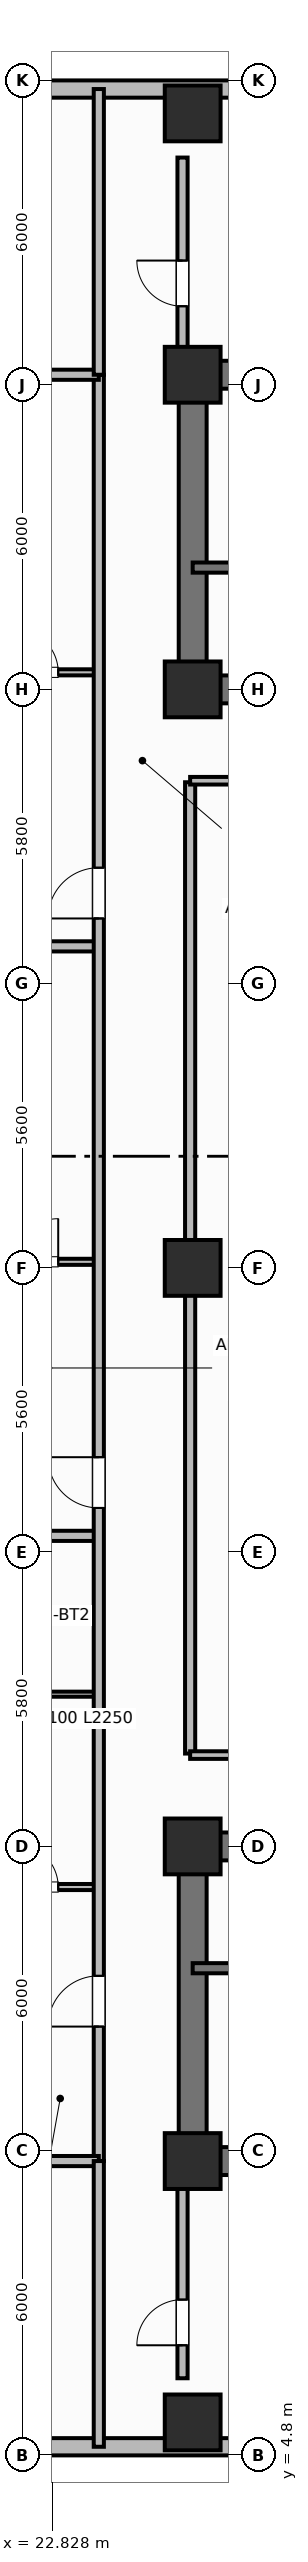
"""IFC4 building model, lengths in metres.
Left out: names, types, materials, properties, quantities, classifications, styles, units other than length and angle.
Written with IfcOpenShell. Run it as: python <this file> out.ifc"""

import sys

from ifc_helpers import new_model, si_unit, direction, frame, frame_2d, origin, origin_2d, place, context, subcontext, project, spatial, rectangle, extrude, element, fill, save


model = new_model("IFC4")
c1 = context("Model", 3, precision=1e-05, world=origin(), true_north=direction((0.0, 1.0)))
c2 = subcontext(c1, "Body", "Model", "MODEL_VIEW")
j1 = project(units=[si_unit("LENGTHUNIT", "METRE"), si_unit("PLANEANGLEUNIT", "RADIAN")], contexts=[c1])
p1 = place(None, origin())
s1 = spatial("IfcSite", under=j1, at=p1, CompositionType="ELEMENT")
p2 = place(p1, origin())
s2 = spatial("IfcBuilding", under=s1, at=p2, CompositionType="ELEMENT")
p3 = place(p2, frame((0.0, 0.0, 110.5)))
s3 = spatial("IfcBuildingStorey", under=s2, at=p3, CompositionType="ELEMENT", Elevation=110.5)
p4 = place(p3, frame((52.8, 10.6, 0.0), z_axis=(0.0, 0.0, 1.0), x_axis=(-1.0, 0.0, 0.0)))
e1 = element("IfcWall", 1, at=p4, inside=s3, PredefinedType="SHEAR", context=c2, shape_type="SweptSolid", body=[
    extrude(rectangle(XDim=27.2, YDim=0.55, at=frame_2d((13.6, 0.0))), origin(), (0.0, 0.0, 1.0), 3.7),
])
p5 = place(p3, frame((25.6, 10.875, 0.0), z_axis=(0.0, 0.0, 1.0), x_axis=(0.0, 1.0, 0.0)))
e2 = element("IfcWall", 2, at=p5, inside=s3, PredefinedType="SHEAR", context=c2, shape_type="SweptSolid", body=[
    extrude(rectangle(XDim=5.65, YDim=0.55, at=frame_2d((2.825, 0.0))), origin(), (0.0, 0.0, 1.0), 3.7),
])
p6 = place(p3, frame((25.6, 16.8, 0.0), z_axis=(0.0, 0.0, 1.0), x_axis=(1.0, 0.0, 0.0)))
e3 = element("IfcWall", 3, at=p6, inside=s3, PredefinedType="SHEAR", context=c2, shape_type="SweptSolid", body=[
    extrude(rectangle(XDim=27.2, YDim=0.55, at=frame_2d((13.6, 0.0))), origin(), (0.0, 0.0, 1.0), 3.7),
])
p7 = place(p6, frame((1.8, 0.0, 0.0)))
e4 = element("IfcOpeningElement", 4, at=p7, cuts=e3, PredefinedType="OPENING", context=c2, shape_type="SweptSolid", body=[
    extrude(rectangle(XDim=1.1, YDim=2.15, at=frame_2d((0.55, 1.075))), frame((0.0, 0.285, 0.0), z_axis=(0.0, -1.0, 0.0), x_axis=(1.0, 0.0, 0.0)), (0.0, 0.0, 1.0), 0.57),
])
p8 = place(p6, frame((5.6, 0.0, 0.0)))
e5 = element("IfcOpeningElement", 5, at=p8, cuts=e3, PredefinedType="OPENING", context=c2, shape_type="SweptSolid", body=[
    extrude(rectangle(XDim=0.85, YDim=2.1, at=frame_2d((0.425, 1.05))), frame((0.0, 0.285, 0.0), z_axis=(0.0, -1.0, 0.0), x_axis=(1.0, 0.0, 0.0)), (0.0, 0.0, 1.0), 0.57),
])
p9 = place(p6, frame((13.0, 0.0, 0.0)))
e6 = element("IfcOpeningElement", 6, at=p9, cuts=e3, PredefinedType="OPENING", context=c2, shape_type="SweptSolid", body=[
    extrude(rectangle(XDim=1.2, YDim=2.15, at=frame_2d((0.6, 1.075))), frame((0.0, 0.285, 0.0), z_axis=(0.0, -1.0, 0.0), x_axis=(1.0, 0.0, 0.0)), (0.0, 0.0, 1.0), 0.57),
])
p10 = place(p6, frame((19.2, 0.0, 0.0)))
e7 = element("IfcOpeningElement", 7, at=p10, cuts=e3, PredefinedType="OPENING", context=c2, shape_type="SweptSolid", body=[
    extrude(rectangle(XDim=0.85, YDim=2.1, at=frame_2d((0.425, 1.05))), frame((0.0, 0.285, 0.0), z_axis=(0.0, -1.0, 0.0), x_axis=(1.0, 0.0, 0.0)), (0.0, 0.0, 1.0), 0.57),
])
p11 = place(p6, frame((23.8, 0.0, 0.0)))
e8 = element("IfcOpeningElement", 8, at=p11, cuts=e3, PredefinedType="OPENING", context=c2, shape_type="SweptSolid", body=[
    extrude(rectangle(XDim=0.9, YDim=2.1, at=frame_2d((0.45, 1.05))), frame((0.0, 0.285, 0.0), z_axis=(0.0, -1.0, 0.0), x_axis=(1.0, 0.0, 0.0)), (0.0, 0.0, 1.0), 0.57),
])
p12 = place(p3, frame((25.6, 45.8, 0.0), z_axis=(0.0, 0.0, 1.0), x_axis=(1.0, 0.0, 0.0)))
e9 = element("IfcWall", 9, at=p12, inside=s3, PredefinedType="SHEAR", context=c2, shape_type="SweptSolid", body=[
    extrude(rectangle(XDim=27.2, YDim=0.55, at=frame_2d((13.6, 0.0))), origin(), (0.0, 0.0, 1.0), 3.7),
])
p13 = place(p3, frame((25.6, 39.875, 0.0), z_axis=(0.0, 0.0, 1.0), x_axis=(0.0, 1.0, 0.0)))
e10 = element("IfcWall", 10, at=p13, inside=s3, PredefinedType="SHEAR", context=c2, shape_type="SweptSolid", body=[
    extrude(rectangle(XDim=5.65, YDim=0.55, at=frame_2d((2.825, 0.0))), origin(), (0.0, 0.0, 1.0), 3.7),
])
p14 = place(p3, frame((52.8, 39.6, 0.0), z_axis=(0.0, 0.0, 1.0), x_axis=(-1.0, 0.0, 0.0)))
e11 = element("IfcWall", 11, at=p14, inside=s3, PredefinedType="SHEAR", context=c2, shape_type="SweptSolid", body=[
    extrude(rectangle(XDim=27.2, YDim=0.55, at=frame_2d((13.6, 0.0))), origin(), (0.0, 0.0, 1.0), 3.7),
])
p15 = place(p14, frame((24.2, 0.0, 0.0)))
e12 = element("IfcOpeningElement", 12, at=p15, cuts=e11, PredefinedType="OPENING", context=c2, shape_type="SweptSolid", body=[
    extrude(rectangle(XDim=1.1, YDim=2.15, at=frame_2d((0.55, 1.075))), frame((0.0, 0.285, 0.0), z_axis=(0.0, -1.0, 0.0), x_axis=(1.0, 0.0, 0.0)), (0.0, 0.0, 1.0), 0.57),
])
p16 = place(p14, frame((20.55, 0.0, 0.0)))
e13 = element("IfcOpeningElement", 13, at=p16, cuts=e11, PredefinedType="OPENING", context=c2, shape_type="SweptSolid", body=[
    extrude(rectangle(XDim=0.95, YDim=2.1, at=frame_2d((0.475, 1.05))), frame((0.0, 0.285, 0.0), z_axis=(0.0, -1.0, 0.0), x_axis=(1.0, 0.0, 0.0)), (0.0, 0.0, 1.0), 0.57),
])
p17 = place(p14, frame((15.1, 0.0, 0.0)))
e14 = element("IfcOpeningElement", 14, at=p17, cuts=e11, PredefinedType="OPENING", context=c2, shape_type="SweptSolid", body=[
    extrude(rectangle(XDim=1.2, YDim=2.15, at=frame_2d((0.6, 1.075))), frame((0.0, 0.285, 0.0), z_axis=(0.0, -1.0, 0.0), x_axis=(1.0, 0.0, 0.0)), (0.0, 0.0, 1.0), 0.57),
])
p18 = place(p14, frame((11.3, 0.0, 0.0)))
e15 = element("IfcOpeningElement", 15, at=p18, cuts=e11, PredefinedType="OPENING", context=c2, shape_type="SweptSolid", body=[
    extrude(rectangle(XDim=1.3, YDim=2.2, at=frame_2d((0.65, 1.1))), frame((0.0, 0.285, 0.0), z_axis=(0.0, -1.0, 0.0), x_axis=(1.0, 0.0, 0.0)), (0.0, 0.0, 1.0), 0.57),
])
p19 = place(p14, frame((7.25, 0.0, 0.0)))
e16 = element("IfcOpeningElement", 16, at=p19, cuts=e11, PredefinedType="OPENING", context=c2, shape_type="SweptSolid", body=[
    extrude(rectangle(XDim=0.85, YDim=2.1, at=frame_2d((0.425, 1.05))), frame((0.0, 0.285, 0.0), z_axis=(0.0, -1.0, 0.0), x_axis=(1.0, 0.0, 0.0)), (0.0, 0.0, 1.0), 0.57),
])
p20 = place(p14, frame((3.0, 0.0, 0.0)))
e17 = element("IfcOpeningElement", 17, at=p20, cuts=e11, PredefinedType="OPENING", context=c2, shape_type="SweptSolid", body=[
    extrude(rectangle(XDim=0.9, YDim=2.1, at=frame_2d((0.45, 1.05))), frame((0.0, 0.285, 0.0), z_axis=(0.0, -1.0, 0.0), x_axis=(1.0, 0.0, 0.0)), (0.0, 0.0, 1.0), 0.57),
])
for number, where, z_axis, x_axis in (
    (18, (25.6, 10.6, 0.0), (0.0, 0.0, 1.0), (1.0, 0.0, 0.0)),
    (19, (25.6, 16.8, 0.0), (0.0, 0.0, 1.0), (1.0, 0.0, 0.0)),
    (20, (25.6, 39.6, 0.0), (0.0, 0.0, 1.0), (1.0, 0.0, 0.0)),
    (21, (25.6, 45.8, 0.0), (0.0, 0.0, 1.0), (1.0, 0.0, 0.0)),
    (22, (25.6, 28.2, 0.0), (0.0, 0.0, 1.0), (1.0, 0.0, 0.0)),
    (23, (25.6, 5.45, 0.0), (0.0, 0.0, 1.0), (1.0, 0.0, 0.0)),
    (24, (25.6, 50.95, 0.0), (0.0, 0.0, 1.0), (1.0, 0.0, 0.0)),
):
    element("IfcColumn", number, at=place(p3, frame(where, z_axis=z_axis, x_axis=x_axis)), inside=s3, PredefinedType="COLUMN", context=c2, shape_type="SweptSolid", body=[
        extrude(rectangle(XDim=1.1, YDim=1.1, at=origin_2d()), origin(), (0.0, 0.0, 1.0), 3.7),
    ])
p21 = place(p3, frame((18.6, 4.97, 0.0), z_axis=(0.0, 0.0, 1.0), x_axis=(1.0, 0.0, 0.0)))
e25 = element("IfcWall", 25, at=p21, inside=s3, PredefinedType="SOLIDWALL", context=c2, shape_type="SweptSolid", body=[
    extrude(rectangle(XDim=17.4, YDim=0.34, at=frame_2d((8.7, 0.0))), origin(), (0.0, 0.0, 1.0), 2.7),
])
p22 = place(p21, frame((1.56, 0.0, 0.73)))
e26 = element("IfcOpeningElement", 26, at=p22, cuts=e25, PredefinedType="OPENING", context=c2, shape_type="SweptSolid", body=[
    extrude(rectangle(XDim=1.4, YDim=1.85, at=frame_2d((0.7, 0.925))), frame((0.0, 0.18, 0.0), z_axis=(0.0, -1.0, 0.0), x_axis=(1.0, 0.0, 0.0)), (0.0, 0.0, 1.0), 0.36),
])
p23 = place(p21, frame((8.35, 0.0, 0.73)))
e27 = element("IfcOpeningElement", 27, at=p23, cuts=e25, PredefinedType="OPENING", context=c2, shape_type="SweptSolid", body=[
    extrude(rectangle(XDim=1.4, YDim=1.85, at=frame_2d((0.7, 0.925))), frame((0.0, 0.18, 0.0), z_axis=(0.0, -1.0, 0.0), x_axis=(1.0, 0.0, 0.0)), (0.0, 0.0, 1.0), 0.36),
])
p24 = place(p21, frame((13.74, 0.0, 0.73)))
e28 = element("IfcOpeningElement", 28, at=p24, cuts=e25, PredefinedType="OPENING", context=c2, shape_type="SweptSolid", body=[
    extrude(rectangle(XDim=1.4, YDim=1.85, at=frame_2d((0.7, 0.925))), frame((0.0, 0.18, 0.0), z_axis=(0.0, -1.0, 0.0), x_axis=(1.0, 0.0, 0.0)), (0.0, 0.0, 1.0), 0.36),
])
p25 = place(p3, frame((36.0, 51.43, 0.0), z_axis=(0.0, 0.0, 1.0), x_axis=(-1.0, 0.0, 0.0)))
e29 = element("IfcWall", 29, at=p25, inside=s3, PredefinedType="SOLIDWALL", context=c2, shape_type="SweptSolid", body=[
    extrude(rectangle(XDim=17.4, YDim=0.34, at=frame_2d((8.7, 0.0))), origin(), (0.0, 0.0, 1.0), 2.7),
])
p26 = place(p25, frame((2.113, 0.0, 0.73)))
e30 = element("IfcOpeningElement", 30, at=p26, cuts=e29, PredefinedType="OPENING", context=c2, shape_type="SweptSolid", body=[
    extrude(rectangle(XDim=1.8, YDim=1.85, at=frame_2d((0.9, 0.925))), frame((0.0, 0.18, 0.0), z_axis=(0.0, -1.0, 0.0), x_axis=(1.0, 0.0, 0.0)), (0.0, 0.0, 1.0), 0.36),
])
p27 = place(p25, frame((5.788, 0.0, 0.73)))
e31 = element("IfcOpeningElement", 31, at=p27, cuts=e29, PredefinedType="OPENING", context=c2, shape_type="SweptSolid", body=[
    extrude(rectangle(XDim=1.8, YDim=1.85, at=frame_2d((0.9, 0.925))), frame((0.0, 0.18, 0.0), z_axis=(0.0, -1.0, 0.0), x_axis=(1.0, 0.0, 0.0)), (0.0, 0.0, 1.0), 0.36),
])
p28 = place(p25, frame((13.837, 0.0, 0.73)))
e32 = element("IfcOpeningElement", 32, at=p28, cuts=e29, PredefinedType="OPENING", context=c2, shape_type="SweptSolid", body=[
    extrude(rectangle(XDim=1.8, YDim=1.85, at=frame_2d((0.9, 0.925))), frame((0.0, 0.18, 0.0), z_axis=(0.0, -1.0, 0.0), x_axis=(1.0, 0.0, 0.0)), (0.0, 0.0, 1.0), 0.36),
])
p29 = place(p3, frame((25.6, 14.4, 0.0), z_axis=(0.0, 0.0, 1.0), x_axis=(1.0, 0.0, 0.0)))
e33 = element("IfcWall", 33, at=p29, inside=s3, PredefinedType="SHEAR", context=c2, shape_type="SweptSolid", body=[
    extrude(rectangle(XDim=9.55, YDim=0.2, at=frame_2d((4.775, 0.0))), origin(), (0.0, 0.0, 1.0), 3.7),
])
p30 = place(p29, frame((1.05, 0.0, 0.0)))
e34 = element("IfcOpeningElement", 34, at=p30, cuts=e33, PredefinedType="OPENING", context=c2, shape_type="SweptSolid", body=[
    extrude(rectangle(XDim=1.1, YDim=2.15, at=frame_2d((0.55, 1.075))), frame((0.0, 0.11, 0.0), z_axis=(0.0, -1.0, 0.0), x_axis=(1.0, 0.0, 0.0)), (0.0, 0.0, 1.0), 0.22),
])
p31 = place(p3, frame((35.15, 42.0, 0.0), z_axis=(0.0, 0.0, 1.0), x_axis=(-1.0, 0.0, 0.0)))
e35 = element("IfcWall", 35, at=p31, inside=s3, PredefinedType="SHEAR", context=c2, shape_type="SweptSolid", body=[
    extrude(rectangle(XDim=9.55, YDim=0.2, at=frame_2d((4.775, 0.0))), origin(), (0.0, 0.0, 1.0), 3.7),
])
p32 = place(p31, frame((7.25, 0.0, 0.0)))
e36 = element("IfcOpeningElement", 36, at=p32, cuts=e35, PredefinedType="OPENING", context=c2, shape_type="SweptSolid", body=[
    extrude(rectangle(XDim=1.1, YDim=2.15, at=frame_2d((0.55, 1.075))), frame((0.0, 0.11, 0.0), z_axis=(0.0, -1.0, 0.0), x_axis=(1.0, 0.0, 0.0)), (0.0, 0.0, 1.0), 0.22),
])
p33 = place(p3, frame((25.55, 18.63, 0.0), z_axis=(0.0, 0.0, 1.0), x_axis=(0.0, 1.0, 0.0)))
e37 = element("IfcWall", 37, at=p33, inside=s3, PredefinedType="PARTITIONING", context=c2, shape_type="SweptSolid", body=[
    extrude(rectangle(XDim=19.14, YDim=0.2, at=frame_2d((9.57, 0.0))), origin(), (0.0, 0.0, 1.0), 2.53),
])
for number, where, z_axis, x_axis in (
    (38, (25.55, 18.6, 0.0), (0.0, 0.0, 1.0), (1.0, 0.0, 0.0)),
    (39, (25.55, 37.8, 0.0), (0.0, 0.0, 1.0), (1.0, 0.0, 0.0)),
):
    element("IfcWall", number, at=place(p3, frame(where, z_axis=z_axis, x_axis=x_axis)), inside=s3, PredefinedType="PARTITIONING", context=c2, shape_type="SweptSolid", body=[
        extrude(rectangle(XDim=6.5, YDim=0.15, at=frame_2d((3.25, 0.0))), origin(), (0.0, 0.0, 1.0), 2.53),
    ])
p34 = place(p3, frame((21.5, 16.0, 0.0), z_axis=(0.0, 0.0, 1.0), x_axis=(1.0, 0.0, 0.0)))
e40 = element("IfcWall", 40, at=p34, inside=s3, PredefinedType="PARTITIONING", context=c2, shape_type="SweptSolid", body=[
    extrude(rectangle(XDim=2.25, YDim=0.12, at=frame_2d((1.125, 0.0))), origin(), (0.0, 0.0, 1.0), 2.53),
])
p35 = place(p34, frame((0.6, 0.0, 0.0)))
e41 = element("IfcOpeningElement", 41, at=p35, cuts=e40, PredefinedType="OPENING", context=c2, shape_type="SweptSolid", body=[
    extrude(rectangle(XDim=0.85, YDim=2.1, at=frame_2d((0.425, 1.05))), frame((0.0, 0.07, 0.0), z_axis=(0.0, -1.0, 0.0), x_axis=(1.0, 0.0, 0.0)), (0.0, 0.0, 1.0), 0.14),
])
p36 = place(p3, frame((21.5, 19.8, 0.0), z_axis=(0.0, 0.0, 1.0), x_axis=(1.0, 0.0, 0.0)))
e42 = element("IfcWall", 42, at=p36, inside=s3, PredefinedType="PARTITIONING", context=c2, shape_type="SweptSolid", body=[
    extrude(rectangle(XDim=2.25, YDim=0.1, at=frame_2d((1.125, 0.0))), origin(), (0.0, 0.0, 1.0), 2.53),
])
p37 = place(p3, frame((14.57, 22.92, 0.0), z_axis=(0.0, 0.0, 1.0), x_axis=(1.0, 0.0, 0.0)))
e43 = element("IfcWall", 43, at=p37, inside=s3, PredefinedType="PARTITIONING", context=c2, shape_type="SweptSolid", body=[
    extrude(rectangle(XDim=9.18, YDim=0.2, at=frame_2d((4.59, 0.0))), origin(), (0.0, 0.0, 1.0), 2.53),
])
p38 = place(p3, frame((21.5, 28.32, 0.0), z_axis=(0.0, 0.0, 1.0), x_axis=(1.0, 0.0, 0.0)))
e44 = element("IfcWall", 44, at=p38, inside=s3, PredefinedType="PARTITIONING", context=c2, shape_type="SweptSolid", body=[
    extrude(rectangle(XDim=2.25, YDim=0.12, at=frame_2d((1.125, 0.0))), origin(), (0.0, 0.0, 1.0), 2.53),
])
p39 = place(p38, frame((0.6, 0.0, 0.0)))
e45 = element("IfcOpeningElement", 45, at=p39, cuts=e44, PredefinedType="OPENING", context=c2, shape_type="SweptSolid", body=[
    extrude(rectangle(XDim=0.85, YDim=2.1, at=frame_2d((0.425, 1.05))), frame((0.0, 0.07, 0.0), z_axis=(0.0, -1.0, 0.0), x_axis=(1.0, 0.0, 0.0)), (0.0, 0.0, 1.0), 0.14),
])
p40 = place(p3, frame((14.57, 34.536, 0.0), z_axis=(0.0, 0.0, 1.0), x_axis=(1.0, 0.0, 0.0)))
e46 = element("IfcWall", 46, at=p40, inside=s3, PredefinedType="PARTITIONING", context=c2, shape_type="SweptSolid", body=[
    extrude(rectangle(XDim=9.18, YDim=0.2, at=frame_2d((4.59, 0.0))), origin(), (0.0, 0.0, 1.0), 2.53),
])
p41 = place(p3, frame((21.5, 39.936, 0.0), z_axis=(0.0, 0.0, 1.0), x_axis=(1.0, 0.0, 0.0)))
e47 = element("IfcWall", 47, at=p41, inside=s3, PredefinedType="PARTITIONING", context=c2, shape_type="SweptSolid", body=[
    extrude(rectangle(XDim=2.25, YDim=0.12, at=frame_2d((1.125, 0.0))), origin(), (0.0, 0.0, 1.0), 2.53),
])
p42 = place(p41, frame((0.6, 0.0, 0.0)))
e48 = element("IfcOpeningElement", 48, at=p42, cuts=e47, PredefinedType="OPENING", context=c2, shape_type="SweptSolid", body=[
    extrude(rectangle(XDim=0.85, YDim=2.1, at=frame_2d((0.425, 1.05))), frame((0.0, 0.07, 0.0), z_axis=(0.0, -1.0, 0.0), x_axis=(1.0, 0.0, 0.0)), (0.0, 0.0, 1.0), 0.14),
])
p43 = place(p3, frame((23.75, 10.6, 0.0), z_axis=(0.0, 0.0, 1.0), x_axis=(0.0, 1.0, 0.0)))
e49 = element("IfcWall", 49, at=p43, inside=s3, PredefinedType="PARTITIONING", context=c2, shape_type="SweptSolid", body=[
    extrude(rectangle(XDim=35.2, YDim=0.2, at=frame_2d((17.6, 0.0))), origin(), (0.0, 0.0, 1.0), 2.53),
])
p44 = place(p43, frame((2.65, 0.0, 0.0)))
e50 = element("IfcOpeningElement", 50, at=p44, cuts=e49, PredefinedType="OPENING", context=c2, shape_type="SweptSolid", body=[
    extrude(rectangle(XDim=1.0, YDim=2.15, at=frame_2d((0.5, 1.075))), frame((0.0, 0.11, 0.0), z_axis=(0.0, -1.0, 0.0), x_axis=(1.0, 0.0, 0.0)), (0.0, 0.0, 1.0), 0.22),
])
p45 = place(p43, frame((12.87, 0.0, 0.0)))
e51 = element("IfcOpeningElement", 51, at=p45, cuts=e49, PredefinedType="OPENING", context=c2, shape_type="SweptSolid", body=[
    extrude(rectangle(XDim=1.0, YDim=2.15, at=frame_2d((0.5, 1.075))), frame((0.0, 0.11, 0.0), z_axis=(0.0, -1.0, 0.0), x_axis=(1.0, 0.0, 0.0)), (0.0, 0.0, 1.0), 0.22),
])
p46 = place(p43, frame((24.486, 0.0, 0.0)))
e52 = element("IfcOpeningElement", 52, at=p46, cuts=e49, PredefinedType="OPENING", context=c2, shape_type="SweptSolid", body=[
    extrude(rectangle(XDim=1.0, YDim=2.15, at=frame_2d((0.5, 1.075))), frame((0.0, 0.11, 0.0), z_axis=(0.0, -1.0, 0.0), x_axis=(1.0, 0.0, 0.0)), (0.0, 0.0, 1.0), 0.22),
])
for number, where, z_axis, x_axis in (
    (53, (14.99, 10.6, 0.0), (0.0, 0.0, 1.0), (1.0, 0.0, 0.0)),
    (54, (14.99, 45.8, 0.0), (0.0, 0.0, 1.0), (1.0, 0.0, 0.0)),
):
    element("IfcWall", number, at=place(p3, frame(where, z_axis=z_axis, x_axis=x_axis)), inside=s3, PredefinedType="PARTITIONING", context=c2, shape_type="SweptSolid", body=[
        extrude(rectangle(XDim=8.76, YDim=0.2, at=frame_2d((4.38, 0.0))), origin(), (0.0, 0.0, 1.0), 2.53),
    ])
p47 = place(p3, frame((23.75, 4.97, 0.0), z_axis=(0.0, 0.0, 1.0), x_axis=(0.0, 1.0, 0.0)))
e55 = element("IfcWall", 55, at=p47, inside=s3, PredefinedType="PARTITIONING", context=c2, shape_type="SweptSolid", body=[
    extrude(rectangle(XDim=5.63, YDim=0.2, at=frame_2d((2.815, 0.0))), origin(), (0.0, 0.0, 1.0), 2.53),
])
p48 = place(p3, frame((23.75, 45.8, 0.0), z_axis=(0.0, 0.0, 1.0), x_axis=(0.0, 1.0, 0.0)))
e56 = element("IfcWall", 56, at=p48, inside=s3, PredefinedType="PARTITIONING", context=c2, shape_type="SweptSolid", body=[
    extrude(rectangle(XDim=5.63, YDim=0.2, at=frame_2d((2.815, 0.0))), origin(), (0.0, 0.0, 1.0), 2.53),
])
p49 = place(p3, frame((25.4, 6.32, 0.0), z_axis=(0.0, 0.0, 1.0), x_axis=(0.0, 1.0, 0.0)))
e57 = element("IfcWall", 57, at=p49, inside=s3, PredefinedType="PARTITIONING", context=c2, shape_type="SweptSolid", body=[
    extrude(rectangle(XDim=3.98, YDim=0.2, at=frame_2d((1.99, 0.0))), origin(), (0.0, 0.0, 1.0), 2.53),
])
p50 = place(p49, frame((0.65, 0.0, 0.0)))
e58 = element("IfcOpeningElement", 58, at=p50, cuts=e57, PredefinedType="OPENING", context=c2, shape_type="SweptSolid", body=[
    extrude(rectangle(XDim=0.9, YDim=2.1, at=frame_2d((0.45, 1.05))), frame((0.0, 0.11, 0.0), z_axis=(0.0, -1.0, 0.0), x_axis=(1.0, 0.0, 0.0)), (0.0, 0.0, 1.0), 0.22),
])
p51 = place(p3, frame((25.4, 46.1, 0.0), z_axis=(0.0, 0.0, 1.0), x_axis=(0.0, 1.0, 0.0)))
e59 = element("IfcWall", 59, at=p51, inside=s3, PredefinedType="PARTITIONING", context=c2, shape_type="SweptSolid", body=[
    extrude(rectangle(XDim=3.98, YDim=0.2, at=frame_2d((1.99, 0.0))), origin(), (0.0, 0.0, 1.0), 2.53),
])
p52 = place(p51, frame((1.05, 0.0, 0.0)))
e60 = element("IfcOpeningElement", 60, at=p52, cuts=e59, PredefinedType="OPENING", context=c2, shape_type="SweptSolid", body=[
    extrude(rectangle(XDim=0.9, YDim=2.1, at=frame_2d((0.45, 1.05))), frame((0.0, 0.11, 0.0), z_axis=(0.0, -1.0, 0.0), x_axis=(1.0, 0.0, 0.0)), (0.0, 0.0, 1.0), 0.22),
])
p53 = place(p35, origin())
e61 = element("IfcDoor", 61, at=p53, inside=s3, OperationType="SINGLE_SWING_LEFT", PredefinedType="DOOR", context=c2, shape_type="SweptSolid", body=[
    extrude(rectangle(XDim=0.85, YDim=2.1, at=frame_2d((0.425, 1.05))), frame((0.0, 0.025, 0.0), z_axis=(0.0, -1.0, 0.0), x_axis=(1.0, 0.0, 0.0)), (0.0, 0.0, 1.0), 0.05),
])
fill(e41, e61)
p54 = place(p39, origin())
e62 = element("IfcDoor", 62, at=p54, inside=s3, OperationType="SINGLE_SWING_RIGHT", PredefinedType="DOOR", context=c2, shape_type="SweptSolid", body=[
    extrude(rectangle(XDim=0.85, YDim=2.1, at=frame_2d((0.425, 1.05))), frame((0.0, 0.025, 0.0), z_axis=(0.0, -1.0, 0.0), x_axis=(1.0, 0.0, 0.0)), (0.0, 0.0, 1.0), 0.05),
])
fill(e45, e62)
p55 = place(p42, origin())
e63 = element("IfcDoor", 63, at=p55, inside=s3, OperationType="SINGLE_SWING_LEFT", PredefinedType="DOOR", context=c2, shape_type="SweptSolid", body=[
    extrude(rectangle(XDim=0.85, YDim=2.1, at=frame_2d((0.425, 1.05))), frame((0.0, 0.025, 0.0), z_axis=(0.0, -1.0, 0.0), x_axis=(1.0, 0.0, 0.0)), (0.0, 0.0, 1.0), 0.05),
])
fill(e48, e63)
p56 = place(p44, origin())
e64 = element("IfcDoor", 64, at=p56, inside=s3, OperationType="SINGLE_SWING_LEFT", PredefinedType="DOOR", context=c2, shape_type="SweptSolid", body=[
    extrude(rectangle(XDim=1.0, YDim=2.15, at=frame_2d((0.5, 1.075))), frame((0.0, 0.025, 0.0), z_axis=(0.0, -1.0, 0.0), x_axis=(1.0, 0.0, 0.0)), (0.0, 0.0, 1.0), 0.05),
])
fill(e50, e64)
p57 = place(p45, origin())
e65 = element("IfcDoor", 65, at=p57, inside=s3, OperationType="SINGLE_SWING_RIGHT", PredefinedType="DOOR", context=c2, shape_type="SweptSolid", body=[
    extrude(rectangle(XDim=1.0, YDim=2.15, at=frame_2d((0.5, 1.075))), frame((0.0, 0.025, 0.0), z_axis=(0.0, -1.0, 0.0), x_axis=(1.0, 0.0, 0.0)), (0.0, 0.0, 1.0), 0.05),
])
fill(e51, e65)
p58 = place(p46, origin())
e66 = element("IfcDoor", 66, at=p58, inside=s3, OperationType="SINGLE_SWING_LEFT", PredefinedType="DOOR", context=c2, shape_type="SweptSolid", body=[
    extrude(rectangle(XDim=1.0, YDim=2.15, at=frame_2d((0.5, 1.075))), frame((0.0, 0.025, 0.0), z_axis=(0.0, -1.0, 0.0), x_axis=(1.0, 0.0, 0.0)), (0.0, 0.0, 1.0), 0.05),
])
fill(e52, e66)
p59 = place(p50, origin())
e67 = element("IfcDoor", 67, at=p59, inside=s3, OperationType="SINGLE_SWING_LEFT", PredefinedType="DOOR", context=c2, shape_type="SweptSolid", body=[
    extrude(rectangle(XDim=0.9, YDim=2.1, at=frame_2d((0.45, 1.05))), frame((0.0, 0.025, 0.0), z_axis=(0.0, -1.0, 0.0), x_axis=(1.0, 0.0, 0.0)), (0.0, 0.0, 1.0), 0.05),
])
fill(e58, e67)
p60 = place(p52, origin())
e68 = element("IfcDoor", 68, at=p60, inside=s3, OperationType="SINGLE_SWING_RIGHT", PredefinedType="DOOR", context=c2, shape_type="SweptSolid", body=[
    extrude(rectangle(XDim=0.9, YDim=2.1, at=frame_2d((0.45, 1.05))), frame((0.0, 0.025, 0.0), z_axis=(0.0, -1.0, 0.0), x_axis=(1.0, 0.0, 0.0)), (0.0, 0.0, 1.0), 0.05),
])
fill(e60, e68)
save(model, sys.argv[1])
